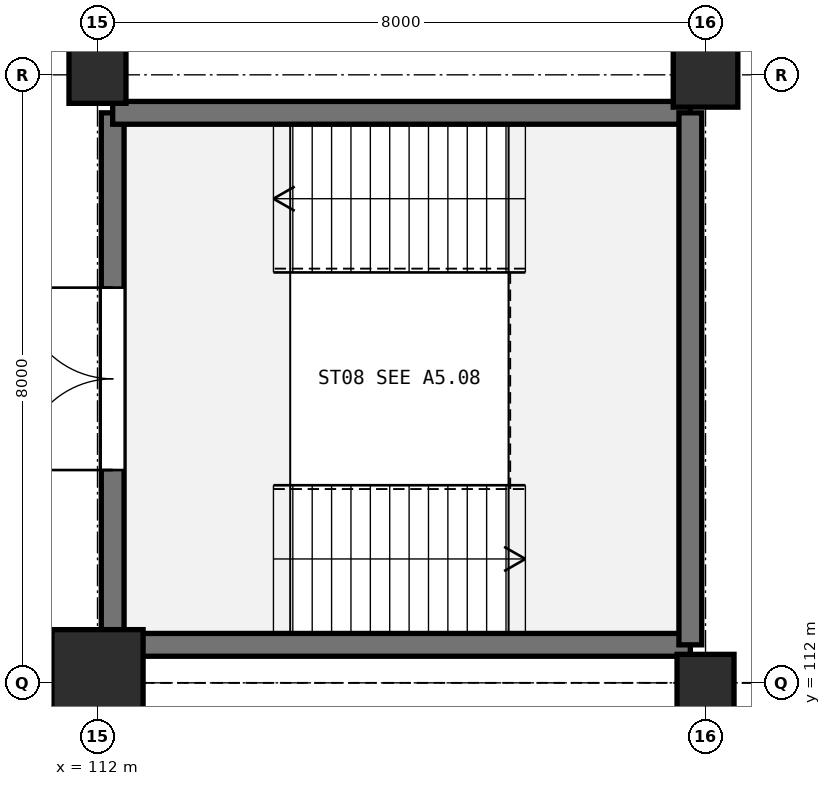
"""IFC4 building model, lengths in metres.
Left out: names, types, materials, properties, quantities, classifications, styles, units other than length and angle.
Written with IfcOpenShell. Run it as: python <this file> out.ifc"""

import sys

from ifc_helpers import new_model, si_unit, direction, frame, frame_2d, origin, origin_2d, place, context, subcontext, project, spatial, rectangle, extrude, element, fill, save


model = new_model("IFC4")
c1 = context("Model", 3, precision=1e-05, world=origin(), true_north=direction((0.0, 1.0)))
c2 = subcontext(c1, "Body", "Model", "MODEL_VIEW")
j1 = project(units=[si_unit("LENGTHUNIT", "METRE"), si_unit("PLANEANGLEUNIT", "RADIAN")], contexts=[c1])
p1 = place(None, origin())
s1 = spatial("IfcSite", under=j1, at=p1, CompositionType="ELEMENT")
p2 = place(p1, origin())
s2 = spatial("IfcBuilding", under=s1, at=p2, CompositionType="ELEMENT")
p3 = place(p2, frame((0.0, 0.0, -4.8)))
s3 = spatial("IfcBuildingStorey", under=s2, at=p3, CompositionType="ELEMENT", Elevation=-4.8)
p4 = place(p3, frame((112.0, 112.0, 0.0), z_axis=(0.0, 0.0, 1.0), x_axis=(1.0, 0.0, 0.0)))
e1 = element("IfcColumn", 1, at=p4, inside=s3, PredefinedType="COLUMN", context=c2, shape_type="SweptSolid", body=[
    extrude(rectangle(XDim=1.2, YDim=1.4, at=origin_2d()), origin(), (0.0, 0.0, 1.0), 4.8),
])
for number, where, z_axis, x_axis in (
    (2, (112.0, 120.0, 0.0), (0.0, 0.0, 1.0), (1.0, 0.0, 0.0)),
    (3, (120.0, 112.0, 0.0), (0.0, 0.0, 1.0), (1.0, 0.0, 0.0)),
):
    element("IfcColumn", number, at=place(p3, frame(where, z_axis=z_axis, x_axis=x_axis)), inside=s3, PredefinedType="COLUMN", context=c2, shape_type="SweptSolid", body=[
        extrude(rectangle(XDim=0.75, YDim=0.75, at=origin_2d()), origin(), (0.0, 0.0, 1.0), 4.8),
    ])
p5 = place(p3, frame((120.0, 120.0, 0.0), z_axis=(0.0, 0.0, 1.0), x_axis=(1.0, 0.0, 0.0)))
e4 = element("IfcColumn", 4, at=p5, inside=s3, PredefinedType="COLUMN", context=c2, shape_type="SweptSolid", body=[
    extrude(rectangle(XDim=0.85, YDim=0.85, at=origin_2d()), origin(), (0.0, 0.0, 1.0), 4.8),
])
p6 = place(p3, frame((119.8, 112.5, 0.0), z_axis=(0.0, 0.0, 1.0), x_axis=(-1.0, 0.0, 0.0)))
e5 = element("IfcWall", 5, at=p6, inside=s3, PredefinedType="SHEAR", context=c2, shape_type="SweptSolid", body=[
    extrude(rectangle(XDim=7.6, YDim=0.3, at=frame_2d((3.8, 0.0))), origin(), (0.0, 0.0, 1.0), 4.46),
])
p7 = place(p3, frame((112.2, 112.5, 0.0), z_axis=(0.0, 0.0, 1.0), x_axis=(0.0, 1.0, 0.0)))
e6 = element("IfcWall", 6, at=p7, inside=s3, PredefinedType="SHEAR", context=c2, shape_type="SweptSolid", body=[
    extrude(rectangle(XDim=7.0, YDim=0.3, at=frame_2d((3.5, 0.0))), origin(), (0.0, 0.0, 1.0), 4.46),
])
p8 = place(p7, frame((2.3, 0.0, 0.0)))
e7 = element("IfcOpeningElement", 7, at=p8, cuts=e6, PredefinedType="OPENING", context=c2, shape_type="SweptSolid", body=[
    extrude(rectangle(XDim=2.4, YDim=2.2, at=frame_2d((1.2, 1.1))), frame((0.0, 0.16, 0.0), z_axis=(0.0, -1.0, 0.0), x_axis=(1.0, 0.0, 0.0)), (0.0, 0.0, 1.0), 0.32),
])
p9 = place(p3, frame((112.2, 119.5, 0.0), z_axis=(0.0, 0.0, 1.0), x_axis=(1.0, 0.0, 0.0)))
e8 = element("IfcWall", 8, at=p9, inside=s3, PredefinedType="SHEAR", context=c2, shape_type="SweptSolid", body=[
    extrude(rectangle(XDim=7.6, YDim=0.3, at=frame_2d((3.8, 0.0))), origin(), (0.0, 0.0, 1.0), 4.46),
])
p10 = place(p3, frame((119.8, 119.5, 0.0), z_axis=(0.0, 0.0, 1.0), x_axis=(0.0, -1.0, 0.0)))
e9 = element("IfcWall", 9, at=p10, inside=s3, PredefinedType="SHEAR", context=c2, shape_type="SweptSolid", body=[
    extrude(rectangle(XDim=7.0, YDim=0.3, at=frame_2d((3.5, 0.0))), origin(), (0.0, 0.0, 1.0), 4.46),
])
p11 = place(p8, frame((2.4, 0.0, 0.0), z_axis=(0.0, 0.0, 1.0), x_axis=(-1.0, 0.0, 0.0)))
e10 = element("IfcDoor", 10, at=p11, inside=s3, OperationType="DOUBLE_DOOR_SINGLE_SWING", PredefinedType="DOOR", context=c2, shape_type="SweptSolid", body=[
    extrude(rectangle(XDim=2.4, YDim=2.2, at=frame_2d((1.2, 1.1))), frame((0.0, 0.025, 0.0), z_axis=(0.0, -1.0, 0.0), x_axis=(1.0, 0.0, 0.0)), (0.0, 0.0, 1.0), 0.05),
])
fill(e7, e10)
save(model, sys.argv[1])
